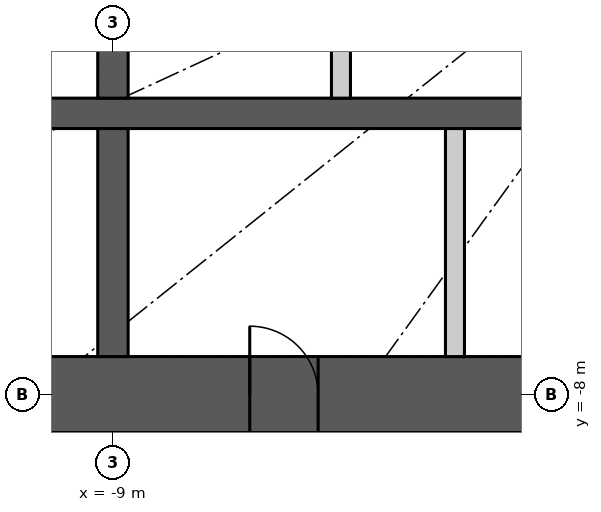
"""IFC4 building model, lengths in metres.
Left out: names, types, materials, properties, quantities, classifications, styles, units other than length and angle.
Written with IfcOpenShell. Run it as: python <this file> out.ifc"""

import sys

from ifc_helpers import new_model, si_unit, direction, frame, frame_2d, origin, place, context, subcontext, project, spatial, rectangle, extrude, element, fill, save


model = new_model("IFC4")
c1 = context("Model", 3, precision=1e-05, world=origin(), true_north=direction((0.0, 1.0)))
c2 = subcontext(c1, "Body", "Model", "MODEL_VIEW")
j1 = project(units=[si_unit("LENGTHUNIT", "METRE"), si_unit("PLANEANGLEUNIT", "RADIAN")], contexts=[c1])
p1 = place(None, origin())
s1 = spatial("IfcSite", under=j1, at=p1, CompositionType="ELEMENT")
p2 = place(p1, origin())
s2 = spatial("IfcBuilding", under=s1, at=p2, CompositionType="ELEMENT")
p3 = place(p2, frame((0.0, 0.0, 57.3)))
s3 = spatial("IfcBuildingStorey", under=s2, at=p3, CompositionType="ELEMENT", Elevation=57.3)
p4 = place(p3, frame((12.5, -8.0, 0.0), z_axis=(0.0, 0.0, 1.0), x_axis=(-1.0, 0.0, 0.0)))
e1 = element("IfcWall", 1, at=p4, inside=s3, PredefinedType="SHEAR", context=c2, shape_type="SweptSolid", body=[
    extrude(rectangle(XDim=25.0, YDim=1.0, at=frame_2d((12.5, 0.0))), origin(), (0.0, 0.0, 1.0), 3.3),
])
p5 = place(p4, frame((11.2, 0.0, 0.0)))
e2 = element("IfcOpeningElement", 2, at=p5, cuts=e1, PredefinedType="OPENING", context=c2, shape_type="SweptSolid", body=[
    extrude(rectangle(XDim=1.2, YDim=2.2, at=frame_2d((0.6, 1.1))), frame((0.0, 0.51, 0.0), z_axis=(0.0, -1.0, 0.0), x_axis=(1.0, 0.0, 0.0)), (0.0, 0.0, 1.0), 1.02),
])
p6 = place(p4, frame((18.8, 0.0, 0.0)))
e3 = element("IfcOpeningElement", 3, at=p6, cuts=e1, PredefinedType="OPENING", context=c2, shape_type="SweptSolid", body=[
    extrude(rectangle(XDim=0.9, YDim=2.2, at=frame_2d((0.45, 1.1))), frame((0.0, 0.51, 0.0), z_axis=(0.0, -1.0, 0.0), x_axis=(1.0, 0.0, 0.0)), (0.0, 0.0, 1.0), 1.02),
])
p7 = place(p3, frame((-11.5, -4.3, 0.0), z_axis=(0.0, 0.0, 1.0), x_axis=(1.0, 0.0, 0.0)))
e4 = element("IfcWall", 4, at=p7, inside=s3, PredefinedType="SHEAR", context=c2, shape_type="SweptSolid", body=[
    extrude(rectangle(XDim=23.0, YDim=0.4, at=frame_2d((11.5, 0.0))), origin(), (0.0, 0.0, 1.0), 3.3),
])
p8 = place(p3, frame((-9.0, -4.1, 0.0), z_axis=(0.0, 0.0, 1.0), x_axis=(0.0, 1.0, 0.0)))
e5 = element("IfcWall", 5, at=p8, inside=s3, PredefinedType="SHEAR", context=c2, shape_type="SweptSolid", body=[
    extrude(rectangle(XDim=2.35, YDim=0.4, at=frame_2d((1.175, 0.0))), origin(), (0.0, 0.0, 1.0), 3.3),
])
p9 = place(p3, frame((-9.0, -7.5, 0.0), z_axis=(0.0, 0.0, 1.0), x_axis=(0.0, 1.0, 0.0)))
e6 = element("IfcWall", 6, at=p9, inside=s3, PredefinedType="SHEAR", context=c2, shape_type="SweptSolid", body=[
    extrude(rectangle(XDim=3.0, YDim=0.4, at=frame_2d((1.5, 0.0))), origin(), (0.0, 0.0, 1.0), 3.3),
])
p10 = place(p3, frame((-4.5, -7.5, 0.0), z_axis=(0.0, 0.0, 1.0), x_axis=(0.0, 1.0, 0.0)))
e7 = element("IfcWall", 7, at=p10, inside=s3, PredefinedType="PARTITIONING", context=c2, shape_type="SweptSolid", body=[
    extrude(rectangle(XDim=3.0, YDim=0.25, at=frame_2d((1.5, 0.0))), origin(), (0.0, 0.0, 1.0), 3.3),
])
p11 = place(p3, frame((-6.0, -4.1, 0.0), z_axis=(0.0, 0.0, 1.0), x_axis=(0.0, 1.0, 0.0)))
e8 = element("IfcWall", 8, at=p11, inside=s3, PredefinedType="PARTITIONING", context=c2, shape_type="SweptSolid", body=[
    extrude(rectangle(XDim=2.35, YDim=0.25, at=frame_2d((1.175, 0.0))), origin(), (0.0, 0.0, 1.0), 3.3),
])
p12 = place(p6, origin())
e9 = element("IfcDoor", 9, at=p12, inside=s3, OperationType="SINGLE_SWING_RIGHT", PredefinedType="DOOR", context=c2, shape_type="SweptSolid", body=[
    extrude(rectangle(XDim=0.9, YDim=2.2, at=frame_2d((0.45, 1.1))), frame((0.0, 0.025, 0.0), z_axis=(0.0, -1.0, 0.0), x_axis=(1.0, 0.0, 0.0)), (0.0, 0.0, 1.0), 0.05),
])
fill(e3, e9)
save(model, sys.argv[1])
